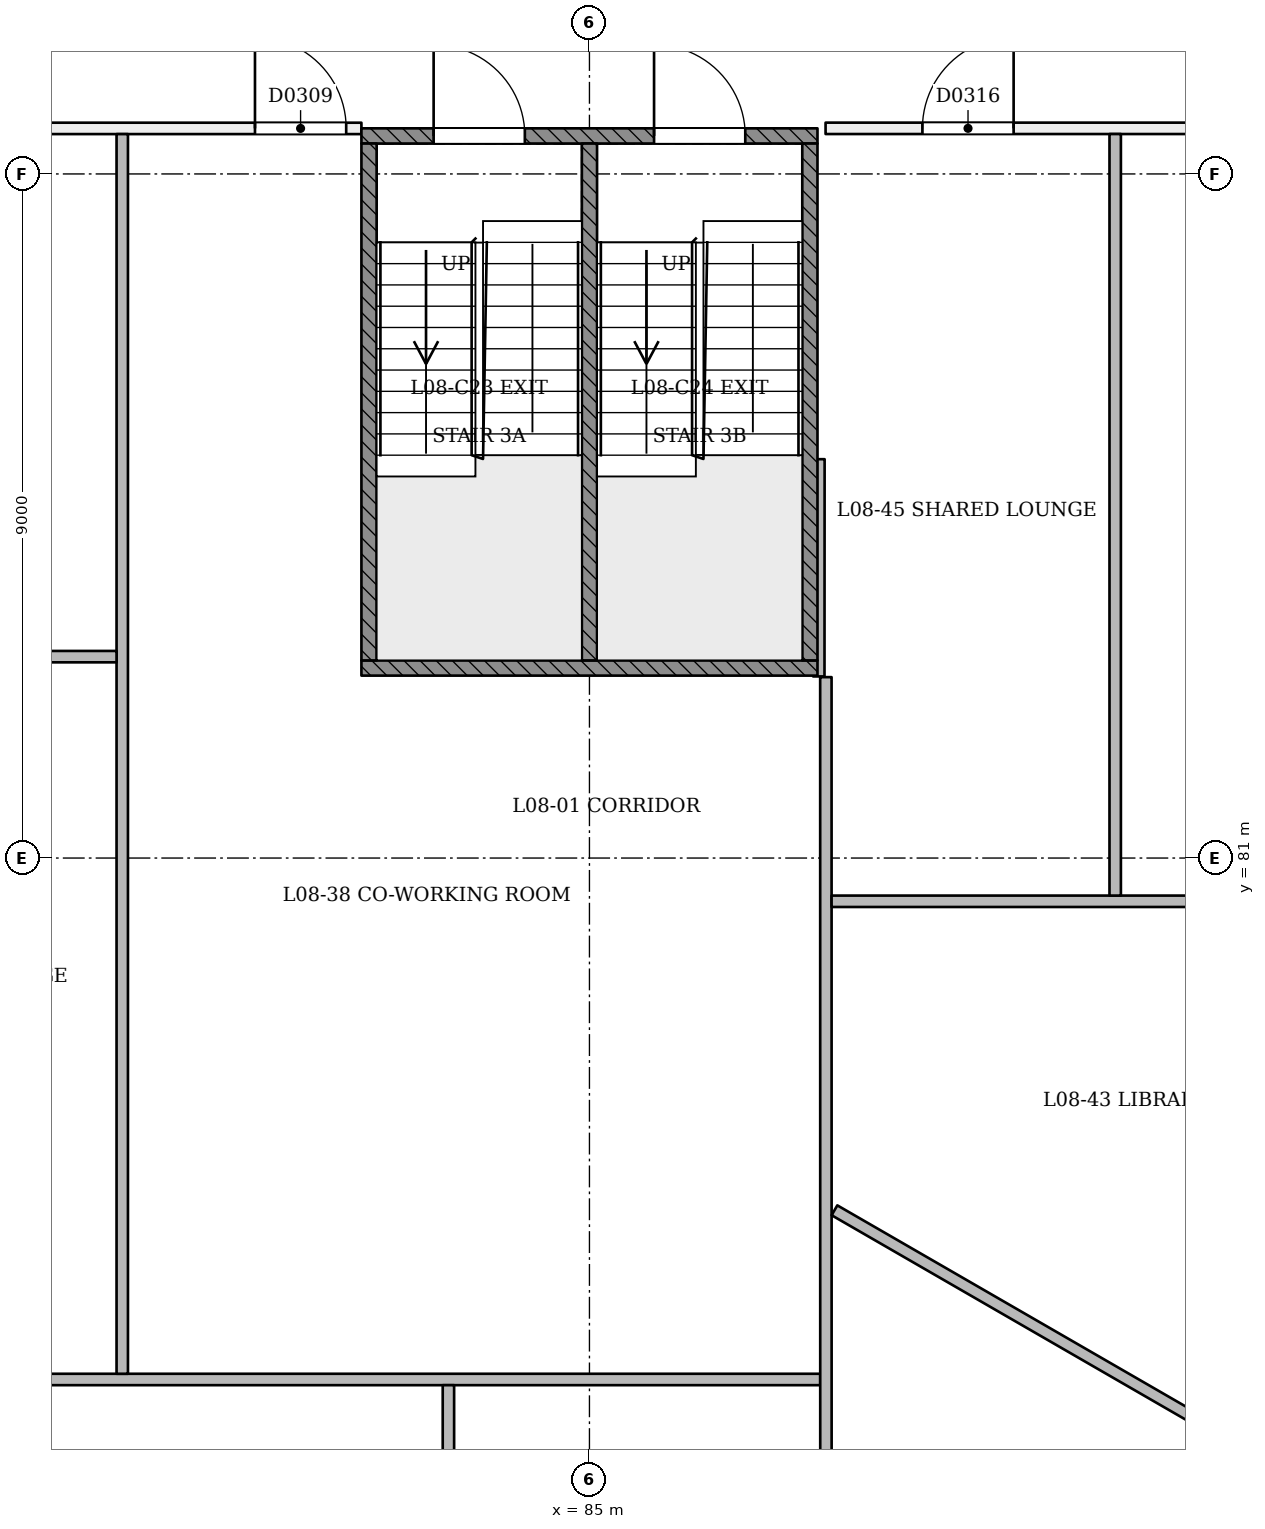
"""IFC4 building model, lengths in metres.
Left out: names, types, materials, properties, quantities, classifications, styles, units other than length and angle.
Written with IfcOpenShell. Run it as: python <this file> out.ifc"""

import sys

from ifc_helpers import new_model, si_unit, direction, frame, frame_2d, origin, place, context, subcontext, project, spatial, rectangle, extrude, element, fill, save


model = new_model("IFC4")
c1 = context("Model", 3, precision=1e-05, world=origin(), true_north=direction((0.0, 1.0)))
c2 = subcontext(c1, "Body", "Model", "MODEL_VIEW")
j1 = project(units=[si_unit("LENGTHUNIT", "METRE"), si_unit("PLANEANGLEUNIT", "RADIAN")], contexts=[c1])
p1 = place(None, origin())
s1 = spatial("IfcSite", under=j1, at=p1, CompositionType="ELEMENT")
p2 = place(p1, origin())
s2 = spatial("IfcBuilding", under=s1, at=p2, CompositionType="ELEMENT")
p3 = place(p2, frame((0.0, 0.0, 37.8)))
s3 = spatial("IfcBuildingStorey", under=s2, at=p3, CompositionType="ELEMENT", Elevation=37.8)
p4 = place(p3, frame((61.497, 96.54, 0.0), z_axis=(0.0, 0.0, 1.0), x_axis=(0.499995935097, -0.866027750645, 0.0)))
e1 = element("IfcWall", 1, at=p4, inside=s3, PredefinedType="PARTITIONING", context=c2, shape_type="SweptSolid", body=[
    extrude(rectangle(XDim=44.742, YDim=0.15, at=frame_2d((22.371, 0.0))), origin(), (0.0, 0.0, 1.0), 2.7),
])
p5 = place(p4, frame((1.84, 0.0, 0.0)))
e2 = element("IfcOpeningElement", 2, at=p5, cuts=e1, PredefinedType="OPENING", context=c2, shape_type="SweptSolid", body=[
    extrude(rectangle(XDim=1.0, YDim=2.1, at=frame_2d((0.5, 1.05))), frame((0.0, 0.085, 0.0), z_axis=(0.0, -1.0, 0.0), x_axis=(1.0, 0.0, 0.0)), (0.0, 0.0, 1.0), 0.171),
])
p6 = place(p4, frame((4.942, 0.0, 0.0)))
e3 = element("IfcOpeningElement", 3, at=p6, cuts=e1, PredefinedType="OPENING", context=c2, shape_type="SweptSolid", body=[
    extrude(rectangle(XDim=1.1, YDim=2.1, at=frame_2d((0.55, 1.05))), frame((0.0, 0.085, 0.0), z_axis=(0.0, -1.0, 0.0), x_axis=(1.0, 0.0, 0.0)), (0.0, 0.0, 1.0), 0.171),
])
p7 = place(p4, frame((11.651, 0.0, 0.0)))
e4 = element("IfcOpeningElement", 4, at=p7, cuts=e1, PredefinedType="OPENING", context=c2, shape_type="SweptSolid", body=[
    extrude(rectangle(XDim=1.0, YDim=2.1, at=frame_2d((0.5, 1.05))), frame((0.0, 0.085, 0.0), z_axis=(0.0, -1.0, 0.0), x_axis=(1.0, 0.0, 0.0)), (0.0, 0.0, 1.0), 0.171),
])
p8 = place(p4, frame((18.371, 0.0, 0.0)))
e5 = element("IfcOpeningElement", 5, at=p8, cuts=e1, PredefinedType="OPENING", context=c2, shape_type="SweptSolid", body=[
    extrude(rectangle(XDim=1.2, YDim=2.1, at=frame_2d((0.6, 1.05))), frame((0.0, 0.085, 0.0), z_axis=(0.0, -1.0, 0.0), x_axis=(1.0, 0.0, 0.0)), (0.0, 0.0, 1.0), 0.171),
])
p9 = place(p4, frame((23.092, 0.0, 0.0)))
e6 = element("IfcOpeningElement", 6, at=p9, cuts=e1, PredefinedType="OPENING", context=c2, shape_type="SweptSolid", body=[
    extrude(rectangle(XDim=1.0, YDim=2.1, at=frame_2d((0.5, 1.05))), frame((0.0, 0.085, 0.0), z_axis=(0.0, -1.0, 0.0), x_axis=(1.0, 0.0, 0.0)), (0.0, 0.0, 1.0), 0.171),
])
p10 = place(p4, frame((29.767, 0.0, 0.0)))
e7 = element("IfcOpeningElement", 7, at=p10, cuts=e1, PredefinedType="OPENING", context=c2, shape_type="SweptSolid", body=[
    extrude(rectangle(XDim=1.0, YDim=2.1, at=frame_2d((0.5, 1.05))), frame((0.0, 0.085, 0.0), z_axis=(0.0, -1.0, 0.0), x_axis=(1.0, 0.0, 0.0)), (0.0, 0.0, 1.0), 0.171),
])
p11 = place(p4, frame((31.976, 0.0, 0.0)))
e8 = element("IfcOpeningElement", 8, at=p11, cuts=e1, PredefinedType="OPENING", context=c2, shape_type="SweptSolid", body=[
    extrude(rectangle(XDim=1.0, YDim=2.1, at=frame_2d((0.5, 1.05))), frame((0.0, 0.085, 0.0), z_axis=(0.0, -1.0, 0.0), x_axis=(1.0, 0.0, 0.0)), (0.0, 0.0, 1.0), 0.171),
])
p12 = place(p4, frame((38.767, 0.0, 0.0)))
e9 = element("IfcOpeningElement", 9, at=p12, cuts=e1, PredefinedType="OPENING", context=c2, shape_type="SweptSolid", body=[
    extrude(rectangle(XDim=1.0, YDim=2.1, at=frame_2d((0.5, 1.05))), frame((0.0, 0.085, 0.0), z_axis=(0.0, -1.0, 0.0), x_axis=(1.0, 0.0, 0.0)), (0.0, 0.0, 1.0), 0.171),
])
p13 = place(p4, frame((40.707, 0.0, 0.0)))
e10 = element("IfcOpeningElement", 10, at=p13, cuts=e1, PredefinedType="OPENING", context=c2, shape_type="SweptSolid", body=[
    extrude(rectangle(XDim=1.0, YDim=2.1, at=frame_2d((0.5, 1.05))), frame((0.0, 0.085, 0.0), z_axis=(0.0, -1.0, 0.0), x_axis=(1.0, 0.0, 0.0)), (0.0, 0.0, 1.0), 0.171),
])
p14 = place(p3, frame((88.317, 61.577, 0.0), z_axis=(0.0, 0.0, 1.0), x_axis=(0.49999894854, 0.866026010844, 0.0)))
e11 = element("IfcWall", 11, at=p14, inside=s3, PredefinedType="PARTITIONING", context=c2, shape_type="SweptSolid", body=[
    extrude(rectangle(XDim=36.0, YDim=0.15, at=frame_2d((18.0, 0.0))), origin(), (0.0, 0.0, 1.0), 2.7),
])
p15 = place(p14, frame((0.72, 0.0, 0.0)))
e12 = element("IfcOpeningElement", 12, at=p15, cuts=e11, PredefinedType="OPENING", context=c2, shape_type="SweptSolid", body=[
    extrude(rectangle(XDim=1.0, YDim=2.1, at=frame_2d((0.5, 1.05))), frame((0.0, 0.085, 0.0), z_axis=(0.0, -1.0, 0.0), x_axis=(1.0, 0.0, 0.0)), (0.0, 0.0, 1.0), 0.171),
])
p16 = place(p14, frame((7.395, 0.0, 0.0)))
e13 = element("IfcOpeningElement", 13, at=p16, cuts=e11, PredefinedType="OPENING", context=c2, shape_type="SweptSolid", body=[
    extrude(rectangle(XDim=1.0, YDim=2.1, at=frame_2d((0.5, 1.05))), frame((0.0, 0.085, 0.0), z_axis=(0.0, -1.0, 0.0), x_axis=(1.0, 0.0, 0.0)), (0.0, 0.0, 1.0), 0.171),
])
p17 = place(p14, frame((9.605, 0.0, 0.0)))
e14 = element("IfcOpeningElement", 14, at=p17, cuts=e11, PredefinedType="OPENING", context=c2, shape_type="SweptSolid", body=[
    extrude(rectangle(XDim=1.0, YDim=2.1, at=frame_2d((0.5, 1.05))), frame((0.0, 0.085, 0.0), z_axis=(0.0, -1.0, 0.0), x_axis=(1.0, 0.0, 0.0)), (0.0, 0.0, 1.0), 0.171),
])
p18 = place(p14, frame((15.25, 0.0, 0.0)))
e15 = element("IfcOpeningElement", 15, at=p18, cuts=e11, PredefinedType="OPENING", context=c2, shape_type="SweptSolid", body=[
    extrude(rectangle(XDim=1.0, YDim=2.1, at=frame_2d((0.5, 1.05))), frame((0.0, 0.085, 0.0), z_axis=(0.0, -1.0, 0.0), x_axis=(1.0, 0.0, 0.0)), (0.0, 0.0, 1.0), 0.171),
])
p19 = place(p14, frame((18.605, 0.0, 0.0)))
e16 = element("IfcOpeningElement", 16, at=p19, cuts=e11, PredefinedType="OPENING", context=c2, shape_type="SweptSolid", body=[
    extrude(rectangle(XDim=1.0, YDim=2.1, at=frame_2d((0.5, 1.05))), frame((0.0, 0.085, 0.0), z_axis=(0.0, -1.0, 0.0), x_axis=(1.0, 0.0, 0.0)), (0.0, 0.0, 1.0), 0.171),
])
p20 = place(p14, frame((25.395, 0.0, 0.0)))
e17 = element("IfcOpeningElement", 17, at=p20, cuts=e11, PredefinedType="OPENING", context=c2, shape_type="SweptSolid", body=[
    extrude(rectangle(XDim=1.0, YDim=2.1, at=frame_2d((0.5, 1.05))), frame((0.0, 0.085, 0.0), z_axis=(0.0, -1.0, 0.0), x_axis=(1.0, 0.0, 0.0)), (0.0, 0.0, 1.0), 0.171),
])
p21 = place(p14, frame((29.8, 0.0, 0.0)))
e18 = element("IfcOpeningElement", 18, at=p21, cuts=e11, PredefinedType="OPENING", context=c2, shape_type="SweptSolid", body=[
    extrude(rectangle(XDim=1.2, YDim=2.1, at=frame_2d((0.6, 1.05))), frame((0.0, 0.085, 0.0), z_axis=(0.0, -1.0, 0.0), x_axis=(1.0, 0.0, 0.0)), (0.0, 0.0, 1.0), 0.171),
])
p22 = place(p3, frame((88.106, 90.6, 0.0), z_axis=(0.0, 0.0, 1.0), x_axis=(1.0, 0.0, 0.0)))
e19 = element("IfcWall", 19, at=p22, inside=s3, PredefinedType="PARTITIONING", context=c2, shape_type="SweptSolid", body=[
    extrude(rectangle(XDim=14.759, YDim=0.15, at=frame_2d((7.379, 0.0))), origin(), (0.0, 0.0, 1.0), 3.1),
])
p23 = place(p22, frame((5.209, 0.0, 0.0)))
e20 = element("IfcOpeningElement", 20, at=p23, cuts=e19, PredefinedType="OPENING", context=c2, shape_type="SweptSolid", body=[
    extrude(rectangle(XDim=1.2, YDim=2.1, at=frame_2d((0.6, 1.05))), frame((0.0, 0.085, 0.0), z_axis=(0.0, -1.0, 0.0), x_axis=(1.0, 0.0, 0.0)), (0.0, 0.0, 1.0), 0.171),
])
p24 = place(p22, frame((1.274, 0.0, 0.0)))
e21 = element("IfcOpeningElement", 21, at=p24, cuts=e19, PredefinedType="OPENING", context=c2, shape_type="SweptSolid", body=[
    extrude(rectangle(XDim=1.2, YDim=2.1, at=frame_2d((0.6, 1.05))), frame((0.0, 0.085, 0.0), z_axis=(0.0, -1.0, 0.0), x_axis=(1.0, 0.0, 0.0)), (0.0, 0.0, 1.0), 0.171),
])
p25 = place(p3, frame((102.995, 90.6, 0.0), z_axis=(0.0, 0.0, 1.0), x_axis=(-0.500002425896, -0.866024003188, 0.0)))
e22 = element("IfcWall", 22, at=p25, inside=s3, PredefinedType="PARTITIONING", context=c2, shape_type="SweptSolid", body=[
    extrude(rectangle(XDim=35.804, YDim=0.15, at=frame_2d((17.902, 0.0))), origin(), (0.0, 0.0, 1.0), 3.1),
])
p26 = place(p25, frame((5.095, 0.0, 0.0)))
e23 = element("IfcOpeningElement", 23, at=p26, cuts=e22, PredefinedType="OPENING", context=c2, shape_type="SweptSolid", body=[
    extrude(rectangle(XDim=1.2, YDim=2.1, at=frame_2d((0.6, 1.05))), frame((0.0, 0.085, 0.0), z_axis=(0.0, -1.0, 0.0), x_axis=(1.0, 0.0, 0.0)), (0.0, 0.0, 1.0), 0.171),
])
p27 = place(p25, frame((15.95, 0.0, 0.0)))
e24 = element("IfcOpeningElement", 24, at=p27, cuts=e22, PredefinedType="OPENING", context=c2, shape_type="SweptSolid", body=[
    extrude(rectangle(XDim=1.2, YDim=2.1, at=frame_2d((0.6, 1.05))), frame((0.0, 0.085, 0.0), z_axis=(0.0, -1.0, 0.0), x_axis=(1.0, 0.0, 0.0)), (0.0, 0.0, 1.0), 0.171),
])
p28 = place(p25, frame((22.564, 0.0, 0.0)))
e25 = element("IfcOpeningElement", 25, at=p28, cuts=e22, PredefinedType="OPENING", context=c2, shape_type="SweptSolid", body=[
    extrude(rectangle(XDim=1.0, YDim=2.1, at=frame_2d((0.5, 1.05))), frame((0.0, 0.085, 0.0), z_axis=(0.0, -1.0, 0.0), x_axis=(1.0, 0.0, 0.0)), (0.0, 0.0, 1.0), 0.171),
])
p29 = place(p3, frame((84.907, 59.593, 0.0), z_axis=(0.0, 0.0, 1.0), x_axis=(-0.500002425896, 0.866024003188, 0.0)))
e26 = element("IfcWall", 26, at=p29, inside=s3, PredefinedType="PARTITIONING", context=c2, shape_type="SweptSolid", body=[
    extrude(rectangle(XDim=35.804, YDim=0.15, at=frame_2d((17.902, 0.0))), origin(), (0.0, 0.0, 1.0), 3.1),
])
p30 = place(p29, frame((2.341, 0.0, 0.0)))
e27 = element("IfcOpeningElement", 27, at=p30, cuts=e26, PredefinedType="OPENING", context=c2, shape_type="SweptSolid", body=[
    extrude(rectangle(XDim=1.2, YDim=2.1, at=frame_2d((0.6, 1.05))), frame((0.0, 0.085, 0.0), z_axis=(0.0, -1.0, 0.0), x_axis=(1.0, 0.0, 0.0)), (0.0, 0.0, 1.0), 0.171),
])
p31 = place(p29, frame((20.792, 0.0, 0.0)))
e28 = element("IfcOpeningElement", 28, at=p31, cuts=e26, PredefinedType="OPENING", context=c2, shape_type="SweptSolid", body=[
    extrude(rectangle(XDim=1.2, YDim=2.1, at=frame_2d((0.6, 1.05))), frame((0.0, 0.085, 0.0), z_axis=(0.0, -1.0, 0.0), x_axis=(1.0, 0.0, 0.0)), (0.0, 0.0, 1.0), 0.171),
])
p32 = place(p29, frame((10.768, 0.0, 0.0)))
e29 = element("IfcOpeningElement", 29, at=p32, cuts=e26, PredefinedType="OPENING", context=c2, shape_type="SweptSolid", body=[
    extrude(rectangle(XDim=1.0, YDim=2.1, at=frame_2d((0.5, 1.05))), frame((0.0, 0.085, 0.0), z_axis=(0.0, -1.0, 0.0), x_axis=(1.0, 0.0, 0.0)), (0.0, 0.0, 1.0), 0.171),
])
p33 = place(p29, frame((29.859, 0.0, 0.0)))
e30 = element("IfcOpeningElement", 30, at=p33, cuts=e26, PredefinedType="OPENING", context=c2, shape_type="SweptSolid", body=[
    extrude(rectangle(XDim=1.0, YDim=2.1, at=frame_2d((0.5, 1.05))), frame((0.0, 0.085, 0.0), z_axis=(0.0, -1.0, 0.0), x_axis=(1.0, 0.0, 0.0)), (0.0, 0.0, 1.0), 0.171),
])
p34 = place(p3, frame((67.135, 90.6, 0.0), z_axis=(0.0, 0.0, 1.0), x_axis=(0.999999997842, -6.569439e-05, 0.0)))
e31 = element("IfcWall", 31, at=p34, inside=s3, PredefinedType="PARTITIONING", context=c2, shape_type="SweptSolid", body=[
    extrude(rectangle(XDim=14.865, YDim=0.15, at=frame_2d((7.433, 0.0))), origin(), (0.0, 0.0, 1.0), 3.1),
])
p35 = place(p34, frame((13.465, 0.0, 0.0)))
e32 = element("IfcOpeningElement", 32, at=p35, cuts=e31, PredefinedType="OPENING", context=c2, shape_type="SweptSolid", body=[
    extrude(rectangle(XDim=1.2, YDim=2.1, at=frame_2d((0.6, 1.05))), frame((0.0, 0.085, 0.0), z_axis=(0.0, -1.0, 0.0), x_axis=(1.0, 0.0, 0.0)), (0.0, 0.0, 1.0), 0.171),
])
p36 = place(p34, frame((8.562, 0.0, 0.0)))
e33 = element("IfcOpeningElement", 33, at=p36, cuts=e31, PredefinedType="OPENING", context=c2, shape_type="SweptSolid", body=[
    extrude(rectangle(XDim=1.0, YDim=2.1, at=frame_2d((0.5, 1.05))), frame((0.0, 0.085, 0.0), z_axis=(0.0, -1.0, 0.0), x_axis=(1.0, 0.0, 0.0)), (0.0, 0.0, 1.0), 0.171),
])
p37 = place(p3, frame((76.638, 74.14, 0.0), z_axis=(0.0, 0.0, 1.0), x_axis=(1.0, 0.0, 0.0)))
e34 = element("IfcWall", 34, at=p37, inside=s3, PredefinedType="PARTITIONING", context=c2, shape_type="SweptSolid", body=[
    extrude(rectangle(XDim=11.398, YDim=0.15, at=frame_2d((5.699, 0.0))), origin(), (0.0, 0.0, 1.0), 3.1),
])
p38 = place(p3, frame((78.854, 90.524, 0.0), z_axis=(0.0, 0.0, 1.0), x_axis=(0.0, -1.0, 0.0)))
e35 = element("IfcWall", 35, at=p38, inside=s3, PredefinedType="PARTITIONING", context=c2, shape_type="SweptSolid", body=[
    extrude(rectangle(XDim=16.309, YDim=0.15, at=frame_2d((8.155, 0.0))), origin(), (0.0, 0.0, 1.0), 3.1),
])
p39 = place(p3, frame((88.017, 83.389, 0.0), z_axis=(0.0, 0.0, 1.0), x_axis=(0.000597983833, 0.999999821208, 0.0)))
e36 = element("IfcWall", 36, at=p39, inside=s3, PredefinedType="PARTITIONING", context=c2, shape_type="SweptSolid", body=[
    extrude(rectangle(XDim=2.858, YDim=0.15, at=frame_2d((1.429, 0.0))), origin(), (0.0, 0.0, 1.0), 3.1),
])
p40 = place(p3, frame((83.145, 74.065, 0.0), z_axis=(0.0, 0.0, 1.0), x_axis=(0.0, -1.0, 0.0)))
e37 = element("IfcWall", 37, at=p40, inside=s3, PredefinedType="PARTITIONING", context=c2, shape_type="SweptSolid", body=[
    extrude(rectangle(XDim=11.14, YDim=0.15, at=frame_2d((5.57, 0.0))), origin(), (0.0, 0.0, 1.0), 3.1),
])
p41 = place(p3, frame((88.112, 65.101, 0.0), z_axis=(0.0, 0.0, 1.0), x_axis=(-8.0138907e-05, 0.999999996789, 0.0)))
e38 = element("IfcWall", 38, at=p41, inside=s3, PredefinedType="PARTITIONING", context=c2, shape_type="SweptSolid", body=[
    extrude(rectangle(XDim=18.279, YDim=0.15, at=frame_2d((9.139, 0.0))), origin(), (0.0, 0.0, 1.0), 3.1),
])
p42 = place(p3, frame((78.779, 83.65, 0.0), z_axis=(0.0, 0.0, 1.0), x_axis=(-1.0, 0.0, 0.0)))
e39 = element("IfcWall", 39, at=p42, inside=s3, PredefinedType="PARTITIONING", context=c2, shape_type="SweptSolid", body=[
    extrude(rectangle(XDim=5.164, YDim=0.15, at=frame_2d((2.582, 0.0))), origin(), (0.0, 0.0, 1.0), 3.1),
])
p43 = place(p3, frame((95.839, 80.431, 0.0), z_axis=(0.0, 0.0, 1.0), x_axis=(-1.0, 0.0, 0.0)))
e40 = element("IfcWall", 40, at=p43, inside=s3, PredefinedType="PARTITIONING", context=c2, shape_type="SweptSolid", body=[
    extrude(rectangle(XDim=7.654, YDim=0.15, at=frame_2d((3.827, 0.0))), origin(), (0.0, 0.0, 1.0), 3.1),
])
p44 = place(p3, frame((88.223, 76.366, 0.0), z_axis=(0.0, 0.0, 1.0), x_axis=(0.866010639187, -0.500025572161, 0.0)))
e41 = element("IfcWall", 41, at=p44, inside=s3, PredefinedType="PARTITIONING", context=c2, shape_type="SweptSolid", body=[
    extrude(rectangle(XDim=5.601, YDim=0.15, at=frame_2d((2.8, 0.0))), origin(), (0.0, 0.0, 1.0), 3.1),
])
p45 = place(p3, frame((91.917, 90.525, 0.0), z_axis=(0.0, 0.0, 1.0), x_axis=(0.0, -1.0, 0.0)))
e42 = element("IfcWall", 42, at=p45, inside=s3, PredefinedType="PARTITIONING", context=c2, shape_type="SweptSolid", body=[
    extrude(rectangle(XDim=10.019, YDim=0.15, at=frame_2d((5.009, 0.0))), origin(), (0.0, 0.0, 1.0), 3.1),
])
p46 = place(p3, frame((82.0, 90.5, 0.0), z_axis=(0.0, 0.0, 1.0), x_axis=(1.0, 0.0, 0.0)))
e43 = element("IfcWall", 43, at=p46, inside=s3, PredefinedType="SOLIDWALL", context=c2, shape_type="SweptSolid", body=[
    extrude(rectangle(XDim=6.0, YDim=0.2, at=frame_2d((3.0, 0.0))), origin(), (0.0, 0.0, 1.0), 3.1),
])
p47 = place(p46, frame((0.95, 0.0, 0.0)))
e44 = element("IfcOpeningElement", 44, at=p47, cuts=e43, PredefinedType="OPENING", context=c2, shape_type="SweptSolid", body=[
    extrude(rectangle(XDim=1.2, YDim=2.1, at=frame_2d((0.6, 1.05))), frame((0.0, 0.11, 0.0), z_axis=(0.0, -1.0, 0.0), x_axis=(1.0, 0.0, 0.0)), (0.0, 0.0, 1.0), 0.221),
])
p48 = place(p46, frame((3.85, 0.0, 0.0)))
e45 = element("IfcOpeningElement", 45, at=p48, cuts=e43, PredefinedType="OPENING", context=c2, shape_type="SweptSolid", body=[
    extrude(rectangle(XDim=1.2, YDim=2.1, at=frame_2d((0.6, 1.05))), frame((0.0, 0.11, 0.0), z_axis=(0.0, -1.0, 0.0), x_axis=(1.0, 0.0, 0.0)), (0.0, 0.0, 1.0), 0.221),
])
p49 = place(p3, frame((82.0, 83.5, 0.0), z_axis=(0.0, 0.0, 1.0), x_axis=(1.0, 0.0, 0.0)))
e46 = element("IfcWall", 46, at=p49, inside=s3, PredefinedType="SOLIDWALL", context=c2, shape_type="SweptSolid", body=[
    extrude(rectangle(XDim=6.0, YDim=0.2, at=frame_2d((3.0, 0.0))), origin(), (0.0, 0.0, 1.0), 3.1),
])
for number, where, z_axis, x_axis in (
    (47, (82.1, 83.6, 0.0), (0.0, 0.0, 1.0), (0.0, 1.0, 0.0)),
    (48, (87.9, 83.6, 0.0), (0.0, 0.0, 1.0), (0.0, 1.0, 0.0)),
    (49, (85.0, 83.6, 0.0), (0.0, 0.0, 1.0), (0.0, 1.0, 0.0)),
):
    element("IfcWall", number, at=place(p3, frame(where, z_axis=z_axis, x_axis=x_axis)), inside=s3, PredefinedType="SOLIDWALL", context=c2, shape_type="SweptSolid", body=[
        extrude(rectangle(XDim=6.8, YDim=0.2, at=frame_2d((3.4, 0.0))), origin(), (0.0, 0.0, 1.0), 3.1),
    ])
p50 = place(p35, origin())
e50 = element("IfcDoor", 50, at=p50, inside=s3, OperationType="SINGLE_SWING_LEFT", PredefinedType="NOTDEFINED", context=c2, shape_type="SweptSolid", body=[
    extrude(rectangle(XDim=1.2, YDim=2.1, at=frame_2d((0.6, 1.05))), frame((0.0, 0.025, 0.0), z_axis=(0.0, -1.0, 0.0), x_axis=(1.0, 0.0, 0.0)), (0.0, 0.0, 1.0), 0.05),
])
fill(e32, e50)
p51 = place(p24, origin())
e51 = element("IfcDoor", 51, at=p51, inside=s3, OperationType="SINGLE_SWING_RIGHT", PredefinedType="NOTDEFINED", context=c2, shape_type="SweptSolid", body=[
    extrude(rectangle(XDim=1.2, YDim=2.1, at=frame_2d((0.6, 1.05))), frame((0.0, 0.025, 0.0), z_axis=(0.0, -1.0, 0.0), x_axis=(1.0, 0.0, 0.0)), (0.0, 0.0, 1.0), 0.05),
])
fill(e21, e51)
p52 = place(p47, origin())
e52 = element("IfcDoor", 52, at=p52, inside=s3, OperationType="SINGLE_SWING_LEFT", PredefinedType="NOTDEFINED", context=c2, shape_type="SweptSolid", body=[
    extrude(rectangle(XDim=1.2, YDim=2.1, at=frame_2d((0.6, 1.05))), frame((0.0, 0.025, 0.0), z_axis=(0.0, -1.0, 0.0), x_axis=(1.0, 0.0, 0.0)), (0.0, 0.0, 1.0), 0.05),
])
fill(e44, e52)
p53 = place(p48, origin())
e53 = element("IfcDoor", 53, at=p53, inside=s3, OperationType="SINGLE_SWING_LEFT", PredefinedType="NOTDEFINED", context=c2, shape_type="SweptSolid", body=[
    extrude(rectangle(XDim=1.2, YDim=2.1, at=frame_2d((0.6, 1.05))), frame((0.0, 0.025, 0.0), z_axis=(0.0, -1.0, 0.0), x_axis=(1.0, 0.0, 0.0)), (0.0, 0.0, 1.0), 0.05),
])
fill(e45, e53)
save(model, sys.argv[1])
